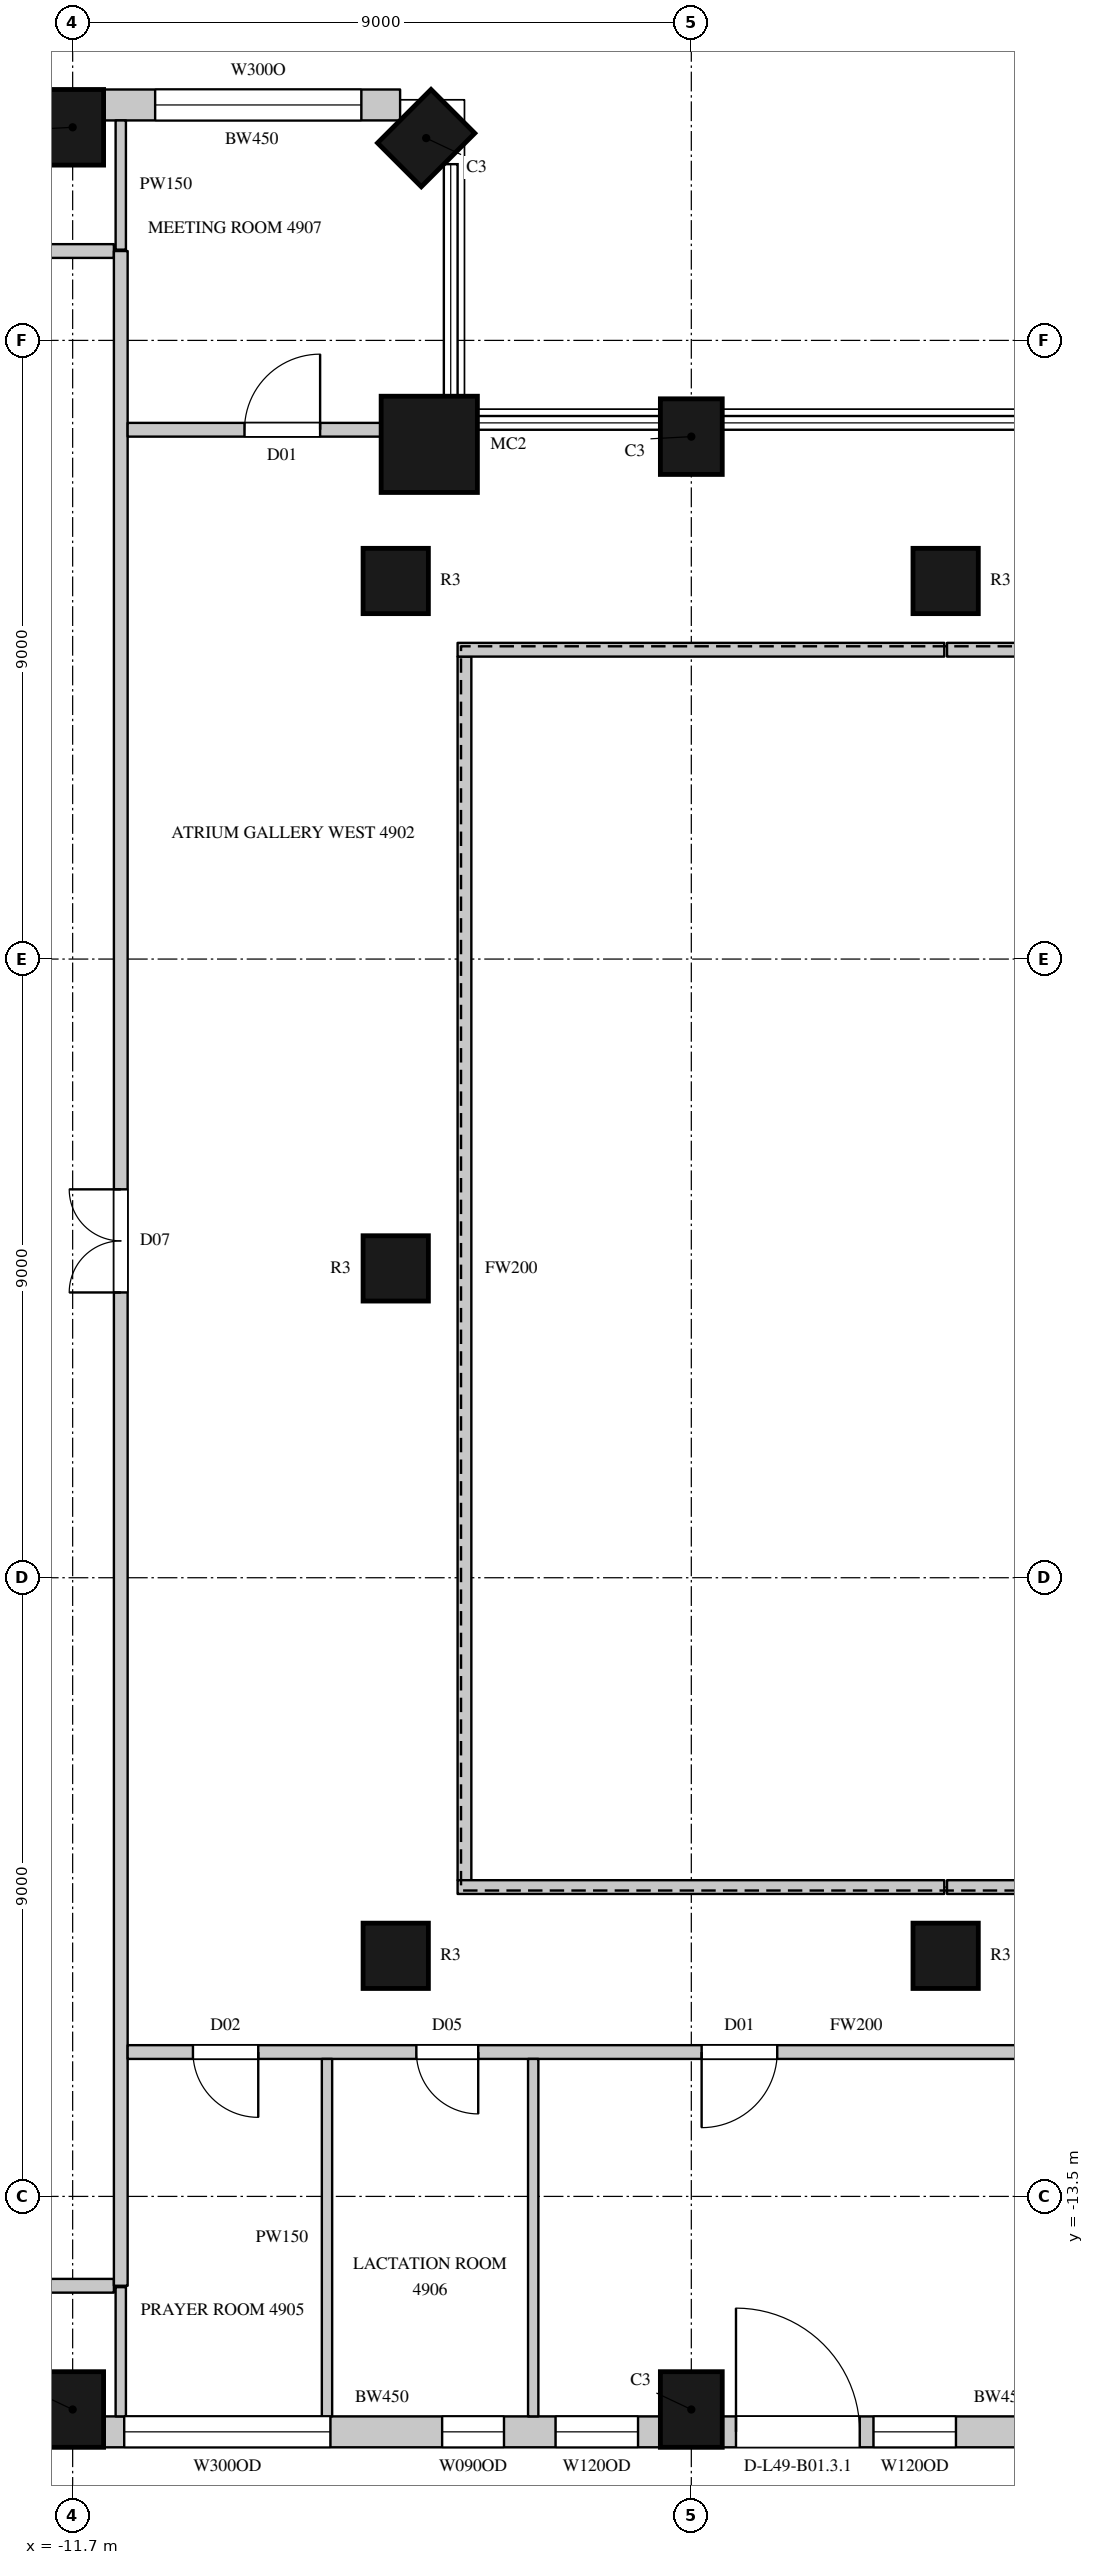
"""IFC4 building model, lengths in metres.
Left out: names, types, materials, properties, quantities, classifications, styles, units other than length and angle.
Written with IfcOpenShell. Run it as: python <this file> out.ifc"""

import sys

from ifc_helpers import new_model, si_unit, direction, frame, frame_2d, origin, origin_2d, place, context, subcontext, project, spatial, rectangle, circle, extrude, element, fill, save


model = new_model("IFC4")
c1 = context("Model", 3, precision=1e-05, world=origin(), true_north=direction((0.0, 1.0)))
c2 = subcontext(c1, "Body", "Model", "MODEL_VIEW")
j1 = project(units=[si_unit("LENGTHUNIT", "METRE"), si_unit("PLANEANGLEUNIT", "RADIAN")], contexts=[c1])
p1 = place(None, origin())
s1 = spatial("IfcSite", under=j1, at=p1, CompositionType="ELEMENT")
p2 = place(p1, origin())
s2 = spatial("IfcBuilding", under=s1, at=p2, CompositionType="ELEMENT")
p3 = place(p2, frame((0.0, 0.0, 222.0)))
s3 = spatial("IfcBuildingStorey", under=s2, at=p3, CompositionType="ELEMENT", Elevation=222.0)
for number, where, z_axis, x_axis in (
    (1, (-11.7, -16.6, 0.0), (0.0, 0.0, 1.0), (1.0, 0.0, 0.0)),
    (2, (-2.7, -16.6, 0.0), (0.0, 0.0, 1.0), (1.0, 0.0, 0.0)),
    (3, (-2.7, 12.1, 0.0), (0.0, 0.0, 1.0), (-1.0, 0.0, 0.0)),
):
    element("IfcColumn", number, at=place(p3, frame(where, z_axis=z_axis, x_axis=x_axis)), inside=s3, PredefinedType="COLUMN", context=c2, shape_type="SweptSolid", body=[
        extrude(rectangle(XDim=0.9, YDim=1.1, at=origin_2d()), origin(), (0.0, 0.0, 1.0), 4.1),
    ])
p4 = place(p3, frame((-6.512, 11.988, 0.0), z_axis=(0.0, 0.0, 1.0), x_axis=(1.0, 0.0, 0.0)))
e4 = element("IfcColumn", 4, at=p4, inside=s3, PredefinedType="COLUMN", context=c2, shape_type="SweptSolid", body=[
    extrude(circle(Radius=0.7, at=origin_2d()), origin(), (0.0, 0.0, 1.0), 4.1),
])
for number, where, z_axis, x_axis in (
    (5, (-6.557, 16.443, 0.0), (0.0, 0.0, 1.0), (-0.707, 0.707, 0.0)),
    (6, (-11.7, 16.6, 0.0), (0.0, 0.0, 1.0), (-1.0, 0.0, 0.0)),
):
    element("IfcColumn", number, at=place(p3, frame(where, z_axis=z_axis, x_axis=x_axis)), inside=s3, PredefinedType="COLUMN", context=c2, shape_type="SweptSolid", body=[
        extrude(rectangle(XDim=0.9, YDim=1.1, at=origin_2d()), origin(), (0.0, 0.0, 1.0), 4.1),
    ])
for number, where, z_axis, x_axis in (
    (7, (-7.0, -10.0, 0.0), (0.0, 0.0, 1.0), (1.0, 0.0, 0.0)),
    (8, (-7.0, 0.0, 0.0), (0.0, 0.0, 1.0), (1.0, 0.0, 0.0)),
    (9, (-7.0, 10.0, 0.0), (0.0, 0.0, 1.0), (1.0, 0.0, 0.0)),
    (10, (1.0, -10.0, 0.0), (0.0, 0.0, 1.0), (1.0, 0.0, 0.0)),
    (11, (1.0, 10.0, 0.0), (0.0, 0.0, 1.0), (1.0, 0.0, 0.0)),
):
    element("IfcColumn", number, at=place(p3, frame(where, z_axis=z_axis, x_axis=x_axis)), inside=s3, PredefinedType="COLUMN", context=c2, shape_type="SweptSolid", body=[
        extrude(circle(Radius=0.475, at=origin_2d()), origin(), (0.0, 0.0, 1.0), 4.1),
    ])
p5 = place(p3, frame((-11.25, -16.925, 0.0), z_axis=(0.0, 0.0, 1.0), x_axis=(1.0, 0.0, 0.0)))
e12 = element("IfcWall", 12, at=p5, inside=s3, PredefinedType="SOLIDWALL", context=c2, shape_type="SweptSolid", body=[
    extrude(rectangle(XDim=8.1, YDim=0.45, at=frame_2d((4.05, 0.0))), origin(), (0.0, 0.0, 1.0), 3.8),
])
p6 = place(p5, frame((0.3, 0.0, 1.05)))
e13 = element("IfcOpeningElement", 13, at=p6, cuts=e12, PredefinedType="OPENING", context=c2, shape_type="SweptSolid", body=[
    extrude(rectangle(XDim=3.0, YDim=2.4, at=frame_2d((1.5, 1.2))), frame((0.0, 0.235, 0.0), z_axis=(0.0, -1.0, 0.0), x_axis=(1.0, 0.0, 0.0)), (0.0, 0.0, 1.0), 0.47),
])
p7 = place(p5, frame((4.925, 0.0, 1.05)))
e14 = element("IfcOpeningElement", 14, at=p7, cuts=e12, PredefinedType="OPENING", context=c2, shape_type="SweptSolid", body=[
    extrude(rectangle(XDim=0.9, YDim=2.4, at=frame_2d((0.45, 1.2))), frame((0.0, 0.235, 0.0), z_axis=(0.0, -1.0, 0.0), x_axis=(1.0, 0.0, 0.0)), (0.0, 0.0, 1.0), 0.47),
])
p8 = place(p5, frame((6.575, 0.0, 1.05)))
e15 = element("IfcOpeningElement", 15, at=p8, cuts=e12, PredefinedType="OPENING", context=c2, shape_type="SweptSolid", body=[
    extrude(rectangle(XDim=1.2, YDim=2.4, at=frame_2d((0.6, 1.2))), frame((0.0, 0.235, 0.0), z_axis=(0.0, -1.0, 0.0), x_axis=(1.0, 0.0, 0.0)), (0.0, 0.0, 1.0), 0.47),
])
p9 = place(p3, frame((-2.25, -16.925, 0.0), z_axis=(0.0, 0.0, 1.0), x_axis=(1.0, 0.0, 0.0)))
e16 = element("IfcWall", 16, at=p9, inside=s3, PredefinedType="SOLIDWALL", context=c2, shape_type="SweptSolid", body=[
    extrude(rectangle(XDim=8.1, YDim=0.45, at=frame_2d((4.05, 0.0))), origin(), (0.0, 0.0, 1.0), 3.8),
])
p10 = place(p9, frame((0.2, 0.0, 0.0)))
e17 = element("IfcOpeningElement", 17, at=p10, cuts=e16, PredefinedType="OPENING", context=c2, shape_type="SweptSolid", body=[
    extrude(rectangle(XDim=1.8, YDim=2.4, at=frame_2d((0.9, 1.2))), frame((0.0, 0.235, 0.0), z_axis=(0.0, -1.0, 0.0), x_axis=(1.0, 0.0, 0.0)), (0.0, 0.0, 1.0), 0.47),
])
p11 = place(p9, frame((2.2, 0.0, 1.05)))
e18 = element("IfcOpeningElement", 18, at=p11, cuts=e16, PredefinedType="OPENING", context=c2, shape_type="SweptSolid", body=[
    extrude(rectangle(XDim=1.2, YDim=2.4, at=frame_2d((0.6, 1.2))), frame((0.0, 0.235, 0.0), z_axis=(0.0, -1.0, 0.0), x_axis=(1.0, 0.0, 0.0)), (0.0, 0.0, 1.0), 0.47),
])
p12 = place(p9, frame((4.8, 0.0, 1.05)))
e19 = element("IfcOpeningElement", 19, at=p12, cuts=e16, PredefinedType="OPENING", context=c2, shape_type="SweptSolid", body=[
    extrude(rectangle(XDim=3.0, YDim=2.4, at=frame_2d((1.5, 1.2))), frame((0.0, 0.235, 0.0), z_axis=(0.0, -1.0, 0.0), x_axis=(1.0, 0.0, 0.0)), (0.0, 0.0, 1.0), 0.47),
])
p13 = place(p3, frame((-6.936, 16.925, 0.0), z_axis=(0.0, 0.0, 1.0), x_axis=(-1.0, 0.0, 0.0)))
e20 = element("IfcWall", 20, at=p13, inside=s3, PredefinedType="SOLIDWALL", context=c2, shape_type="SweptSolid", body=[
    extrude(rectangle(XDim=4.314, YDim=0.45, at=frame_2d((2.157, 0.0))), origin(), (0.0, 0.0, 1.0), 3.8),
])
p14 = place(p13, frame((0.564, 0.0, 1.05)))
e21 = element("IfcOpeningElement", 21, at=p14, cuts=e20, PredefinedType="OPENING", context=c2, shape_type="SweptSolid", body=[
    extrude(rectangle(XDim=3.0, YDim=2.4, at=frame_2d((1.5, 1.2))), frame((0.0, 0.235, 0.0), z_axis=(0.0, -1.0, 0.0), x_axis=(1.0, 0.0, 0.0)), (0.0, 0.0, 1.0), 0.47),
])
for number, where, z_axis, x_axis in (
    (22, (-13.97, -14.8, 0.0), (0.0, 0.0, 1.0), (1.0, 0.0, 0.0)),
    (23, (-13.97, 14.8, 0.0), (0.0, 0.0, 1.0), (1.0, 0.0, 0.0)),
):
    element("IfcWall", number, at=place(p3, frame(where, z_axis=z_axis, x_axis=x_axis)), inside=s3, PredefinedType="PARTITIONING", context=c2, shape_type="SweptSolid", body=[
        extrude(rectangle(XDim=2.87, YDim=0.2, at=frame_2d((1.435, 0.0))), origin(), (0.0, 0.0, 1.0), 3.8),
    ])
p15 = place(p3, frame((-11.0, -14.8, 0.0), z_axis=(0.0, 0.0, 1.0), x_axis=(0.0, 1.0, 0.0)))
e24 = element("IfcWall", 24, at=p15, inside=s3, PredefinedType="PARTITIONING", context=c2, shape_type="SweptSolid", body=[
    extrude(rectangle(XDim=29.6, YDim=0.2, at=frame_2d((14.8, 0.0))), origin(), (0.0, 0.0, 1.0), 3.8),
])
p16 = place(p15, frame((14.45, 0.0, 0.0)))
e25 = element("IfcOpeningElement", 25, at=p16, cuts=e24, PredefinedType="OPENING", context=c2, shape_type="SweptSolid", body=[
    extrude(rectangle(XDim=1.5, YDim=2.4, at=frame_2d((0.75, 1.2))), frame((0.0, 0.11, 0.0), z_axis=(0.0, -1.0, 0.0), x_axis=(1.0, 0.0, 0.0)), (0.0, 0.0, 1.0), 0.22),
])
p17 = place(p3, frame((-10.9, -11.4, 0.0), z_axis=(0.0, 0.0, 1.0), x_axis=(1.0, 0.0, 0.0)))
e26 = element("IfcWall", 26, at=p17, inside=s3, PredefinedType="PARTITIONING", context=c2, shape_type="SweptSolid", body=[
    extrude(rectangle(XDim=21.2, YDim=0.2, at=frame_2d((10.6, 0.0))), origin(), (0.0, 0.0, 1.0), 3.8),
])
p18 = place(p17, frame((0.95, 0.0, 0.0)))
e27 = element("IfcOpeningElement", 27, at=p18, cuts=e26, PredefinedType="OPENING", context=c2, shape_type="SweptSolid", body=[
    extrude(rectangle(XDim=0.95, YDim=2.2, at=frame_2d((0.475, 1.1))), frame((0.0, 0.11, 0.0), z_axis=(0.0, -1.0, 0.0), x_axis=(1.0, 0.0, 0.0)), (0.0, 0.0, 1.0), 0.22),
])
p19 = place(p17, frame((4.2, 0.0, 0.0)))
e28 = element("IfcOpeningElement", 28, at=p19, cuts=e26, PredefinedType="OPENING", context=c2, shape_type="SweptSolid", body=[
    extrude(rectangle(XDim=0.9, YDim=2.2, at=frame_2d((0.45, 1.1))), frame((0.0, 0.11, 0.0), z_axis=(0.0, -1.0, 0.0), x_axis=(1.0, 0.0, 0.0)), (0.0, 0.0, 1.0), 0.22),
])
p20 = place(p17, frame((8.35, 0.0, 0.0)))
e29 = element("IfcOpeningElement", 29, at=p20, cuts=e26, PredefinedType="OPENING", context=c2, shape_type="SweptSolid", body=[
    extrude(rectangle(XDim=1.1, YDim=2.4, at=frame_2d((0.55, 1.2))), frame((0.0, 0.11, 0.0), z_axis=(0.0, -1.0, 0.0), x_axis=(1.0, 0.0, 0.0)), (0.0, 0.0, 1.0), 0.22),
])
p21 = place(p17, frame((18.0, 0.0, 0.0)))
e30 = element("IfcOpeningElement", 30, at=p21, cuts=e26, PredefinedType="OPENING", context=c2, shape_type="SweptSolid", body=[
    extrude(rectangle(XDim=1.1, YDim=2.4, at=frame_2d((0.55, 1.2))), frame((0.0, 0.11, 0.0), z_axis=(0.0, -1.0, 0.0), x_axis=(1.0, 0.0, 0.0)), (0.0, 0.0, 1.0), 0.22),
])
p22 = place(p3, frame((-10.9, 12.2, 0.0), z_axis=(0.0, 0.0, 1.0), x_axis=(1.0, 0.0, 0.0)))
e31 = element("IfcWall", 31, at=p22, inside=s3, PredefinedType="PARTITIONING", context=c2, shape_type="SweptSolid", body=[
    extrude(rectangle(XDim=3.704, YDim=0.2, at=frame_2d((1.852, 0.0))), origin(), (0.0, 0.0, 1.0), 3.8),
])
p23 = place(p22, frame((1.7, 0.0, 0.0)))
e32 = element("IfcOpeningElement", 32, at=p23, cuts=e31, PredefinedType="OPENING", context=c2, shape_type="SweptSolid", body=[
    extrude(rectangle(XDim=1.1, YDim=2.4, at=frame_2d((0.55, 1.2))), frame((0.0, 0.11, 0.0), z_axis=(0.0, -1.0, 0.0), x_axis=(1.0, 0.0, 0.0)), (0.0, 0.0, 1.0), 0.22),
])
p24 = place(p3, frame((-6.0, -8.9, 0.0), z_axis=(0.0, 0.0, 1.0), x_axis=(0.0, 1.0, 0.0)))
e33 = element("IfcWall", 33, at=p24, inside=s3, PredefinedType="PARTITIONING", context=c2, shape_type="SweptSolid", body=[
    extrude(rectangle(XDim=17.8, YDim=0.2, at=frame_2d((8.9, 0.0))), origin(), (0.0, 0.0, 1.0), 3.8),
])
for number, where, z_axis, x_axis in (
    (34, (-6.1, -9.0, 0.0), (0.0, 0.0, 1.0), (1.0, 0.0, 0.0)),
    (35, (-6.1, 9.0, 0.0), (0.0, 0.0, 1.0), (1.0, 0.0, 0.0)),
    (36, (1.02, -9.0, 0.0), (0.0, 0.0, 1.0), (1.0, 0.0, 0.0)),
    (37, (1.02, 9.0, 0.0), (0.0, 0.0, 1.0), (1.0, 0.0, 0.0)),
):
    element("IfcWall", number, at=place(p3, frame(where, z_axis=z_axis, x_axis=x_axis)), inside=s3, PredefinedType="PARTITIONING", context=c2, shape_type="SweptSolid", body=[
        extrude(rectangle(XDim=7.08, YDim=0.2, at=frame_2d((3.54, 0.0))), origin(), (0.0, 0.0, 1.0), 3.8),
    ])
for number, where, z_axis, x_axis in (
    (38, (-11.0, -16.7, 0.0), (0.0, 0.0, 1.0), (0.0, 1.0, 0.0)),
    (39, (-11.0, 14.82, 0.0), (0.0, 0.0, 1.0), (0.0, 1.0, 0.0)),
):
    element("IfcWall", number, at=place(p3, frame(where, z_axis=z_axis, x_axis=x_axis)), inside=s3, PredefinedType="PARTITIONING", context=c2, shape_type="SweptSolid", body=[
        extrude(rectangle(XDim=1.88, YDim=0.15, at=frame_2d((0.94, 0.0))), origin(), (0.0, 0.0, 1.0), 3.8),
    ])
for number, where, z_axis, x_axis in (
    (40, (-8.0, -16.7, 0.0), (0.0, 0.0, 1.0), (0.0, 1.0, 0.0)),
    (41, (-5.0, -16.7, 0.0), (0.0, 0.0, 1.0), (0.0, 1.0, 0.0)),
):
    element("IfcWall", number, at=place(p3, frame(where, z_axis=z_axis, x_axis=x_axis)), inside=s3, PredefinedType="PARTITIONING", context=c2, shape_type="SweptSolid", body=[
        extrude(rectangle(XDim=5.2, YDim=0.15, at=frame_2d((2.6, 0.0))), origin(), (0.0, 0.0, 1.0), 3.8),
    ])
p25 = place(p6, origin())
e42 = element("IfcWindow", 42, at=p25, inside=s3, PartitioningType="SINGLE_PANEL", PredefinedType="WINDOW", context=c2, shape_type="SweptSolid", body=[
    extrude(rectangle(XDim=3.0, YDim=2.4, at=frame_2d((1.5, 1.2))), frame((0.0, 0.135, 0.0), z_axis=(0.0, -1.0, 0.0), x_axis=(1.0, 0.0, 0.0)), (0.0, 0.0, 1.0), 0.06),
])
fill(e13, e42)
p26 = place(p10, origin())
e43 = element("IfcDoor", 43, at=p26, inside=s3, OperationType="SLIDING_TO_LEFT", PredefinedType="DOOR", context=c2, shape_type="SweptSolid", body=[
    extrude(rectangle(XDim=1.8, YDim=2.4, at=frame_2d((0.9, 1.2))), frame((0.0, 0.13, 0.0), z_axis=(0.0, -1.0, 0.0), x_axis=(1.0, 0.0, 0.0)), (0.0, 0.0, 1.0), 0.05),
])
fill(e17, e43)
p27 = place(p11, origin())
e44 = element("IfcWindow", 44, at=p27, inside=s3, PartitioningType="SINGLE_PANEL", PredefinedType="WINDOW", context=c2, shape_type="SweptSolid", body=[
    extrude(rectangle(XDim=1.2, YDim=2.4, at=frame_2d((0.6, 1.2))), frame((0.0, 0.135, 0.0), z_axis=(0.0, -1.0, 0.0), x_axis=(1.0, 0.0, 0.0)), (0.0, 0.0, 1.0), 0.06),
])
fill(e18, e44)
p28 = place(p14, origin())
e45 = element("IfcWindow", 45, at=p28, inside=s3, PartitioningType="SINGLE_PANEL", PredefinedType="WINDOW", context=c2, shape_type="SweptSolid", body=[
    extrude(rectangle(XDim=3.0, YDim=2.4, at=frame_2d((1.5, 1.2))), frame((0.0, 0.135, 0.0), z_axis=(0.0, -1.0, 0.0), x_axis=(1.0, 0.0, 0.0)), (0.0, 0.0, 1.0), 0.06),
])
fill(e21, e45)
p29 = place(p16, origin())
e46 = element("IfcDoor", 46, at=p29, inside=s3, OperationType="DOUBLE_DOOR_SINGLE_SWING", PredefinedType="DOOR", context=c2, shape_type="SweptSolid", body=[
    extrude(rectangle(XDim=1.5, YDim=2.4, at=frame_2d((0.75, 1.2))), frame((0.0, 0.025, 0.0), z_axis=(0.0, -1.0, 0.0), x_axis=(1.0, 0.0, 0.0)), (0.0, 0.0, 1.0), 0.05),
])
fill(e25, e46)
p30 = place(p18, origin())
e47 = element("IfcDoor", 47, at=p30, inside=s3, OperationType="SINGLE_SWING_LEFT", PredefinedType="DOOR", context=c2, shape_type="SweptSolid", body=[
    extrude(rectangle(XDim=0.95, YDim=2.2, at=frame_2d((0.475, 1.1))), frame((0.0, 0.025, 0.0), z_axis=(0.0, -1.0, 0.0), x_axis=(1.0, 0.0, 0.0)), (0.0, 0.0, 1.0), 0.05),
])
fill(e27, e47)
p31 = place(p19, origin())
e48 = element("IfcDoor", 48, at=p31, inside=s3, OperationType="SINGLE_SWING_LEFT", PredefinedType="DOOR", context=c2, shape_type="SweptSolid", body=[
    extrude(rectangle(XDim=0.9, YDim=2.2, at=frame_2d((0.45, 1.1))), frame((0.0, 0.025, 0.0), z_axis=(0.0, -1.0, 0.0), x_axis=(1.0, 0.0, 0.0)), (0.0, 0.0, 1.0), 0.05),
])
fill(e28, e48)
p32 = place(p23, origin())
e49 = element("IfcDoor", 49, at=p32, inside=s3, OperationType="SINGLE_SWING_RIGHT", PredefinedType="DOOR", context=c2, shape_type="SweptSolid", body=[
    extrude(rectangle(XDim=1.1, YDim=2.4, at=frame_2d((0.55, 1.2))), frame((0.0, 0.025, 0.0), z_axis=(0.0, -1.0, 0.0), x_axis=(1.0, 0.0, 0.0)), (0.0, 0.0, 1.0), 0.05),
])
fill(e32, e49)
p33 = place(p20, origin())
e50 = element("IfcDoor", 50, at=p33, inside=s3, OperationType="SINGLE_SWING_RIGHT", PredefinedType="DOOR", context=c2, shape_type="SweptSolid", body=[
    extrude(rectangle(XDim=1.1, YDim=2.4, at=frame_2d((0.55, 1.2))), frame((0.0, 0.025, 0.0), z_axis=(0.0, -1.0, 0.0), x_axis=(1.0, 0.0, 0.0)), (0.0, 0.0, 1.0), 0.05),
])
fill(e29, e50)
p34 = place(p7, origin())
e51 = element("IfcWindow", 51, at=p34, inside=s3, PartitioningType="SINGLE_PANEL", PredefinedType="WINDOW", context=c2, shape_type="SweptSolid", body=[
    extrude(rectangle(XDim=0.9, YDim=2.4, at=frame_2d((0.45, 1.2))), frame((0.0, 0.135, 0.0), z_axis=(0.0, -1.0, 0.0), x_axis=(1.0, 0.0, 0.0)), (0.0, 0.0, 1.0), 0.06),
])
fill(e14, e51)
p35 = place(p8, origin())
e52 = element("IfcWindow", 52, at=p35, inside=s3, PartitioningType="SINGLE_PANEL", PredefinedType="WINDOW", context=c2, shape_type="SweptSolid", body=[
    extrude(rectangle(XDim=1.2, YDim=2.4, at=frame_2d((0.6, 1.2))), frame((0.0, 0.135, 0.0), z_axis=(0.0, -1.0, 0.0), x_axis=(1.0, 0.0, 0.0)), (0.0, 0.0, 1.0), 0.06),
])
fill(e15, e52)
save(model, sys.argv[1])
